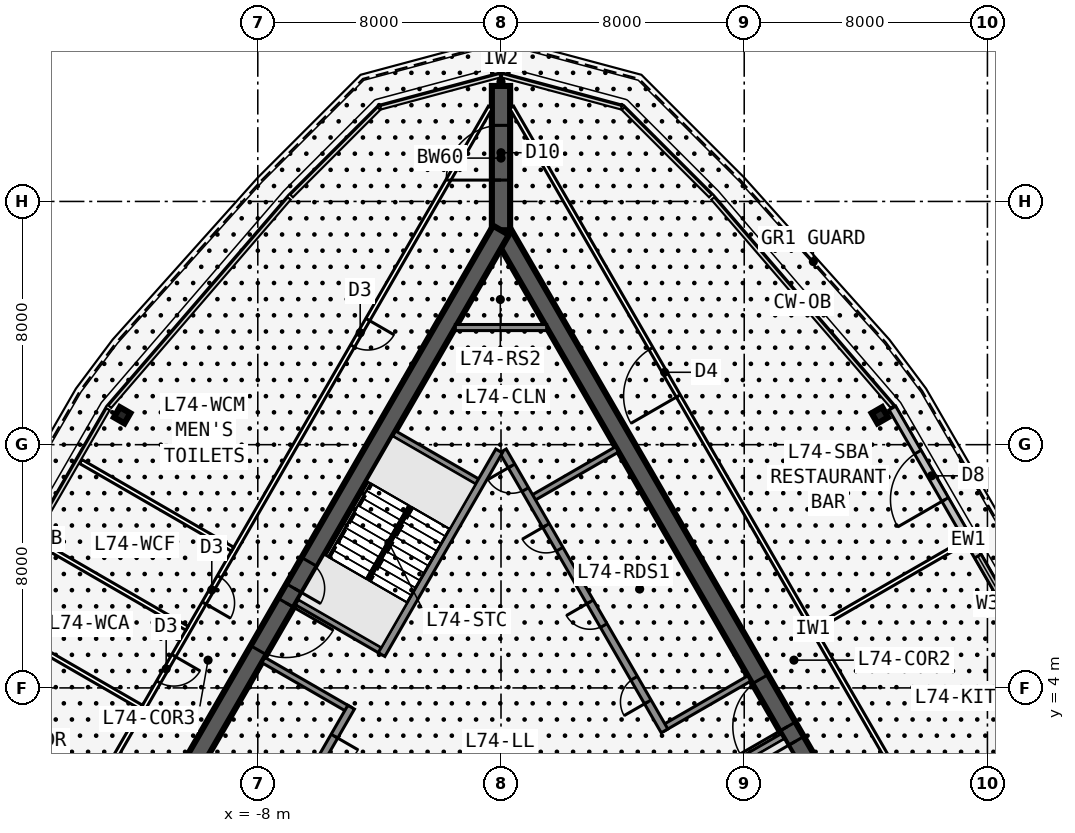
"""IFC4 building model, lengths in metres.
Left out: names, types, materials, properties, quantities, classifications, styles, units other than length and angle.
Written with IfcOpenShell. Run it as: python <this file> out.ifc"""

import sys

from ifc_helpers import new_model, si_unit, direction, frame, frame_2d, origin, origin_2d, place, context, subcontext, project, spatial, rectangle, i_section, extrude, element, fill, save


model = new_model("IFC4")
c1 = context("Model", 3, precision=1e-05, world=origin(), true_north=direction((0.0, 1.0)))
c2 = subcontext(c1, "Body", "Model", "MODEL_VIEW")
j1 = project(units=[si_unit("LENGTHUNIT", "METRE"), si_unit("PLANEANGLEUNIT", "RADIAN")], contexts=[c1])
p1 = place(None, origin())
s1 = spatial("IfcSite", under=j1, at=p1, CompositionType="ELEMENT")
p2 = place(p1, origin())
s2 = spatial("IfcBuilding", under=s1, at=p2, CompositionType="ELEMENT")
p3 = place(p2, frame((0.0, 0.0, 281.3)))
s3 = spatial("IfcBuildingStorey", under=s2, at=p3, CompositionType="ELEMENT", Elevation=281.3)
p4 = place(p3, frame((16.5, -9.526, 0.0), z_axis=(0.0, 0.0, 1.0), x_axis=(-0.499999749417, 0.866025548458, 0.0)))
e1 = element("IfcWall", 1, at=p4, inside=s3, PredefinedType="SHEAR", context=c2, shape_type="SweptSolid", body=[
    extrude(rectangle(XDim=33.0, YDim=0.6, at=frame_2d((16.5, 0.0))), origin(), (0.0, 0.0, 1.0), 5.5),
])
p5 = place(p4, frame((14.15, 0.0, 0.0)))
e2 = element("IfcOpeningElement", 2, at=p5, cuts=e1, PredefinedType="OPENING", context=c2, shape_type="SweptSolid", body=[
    extrude(rectangle(XDim=1.8, YDim=2.13, at=frame_2d((0.9, 1.065))), frame((0.0, 0.31, 0.0), z_axis=(0.0, -1.0, 0.0), x_axis=(1.0, 0.0, 0.0)), (0.0, 0.0, 1.0), 0.62),
])
p6 = place(p4, frame((12.6, 0.0, 0.0)))
e3 = element("IfcOpeningElement", 3, at=p6, cuts=e1, PredefinedType="OPENING", context=c2, shape_type="SweptSolid", body=[
    extrude(rectangle(XDim=1.0, YDim=2.13, at=frame_2d((0.5, 1.065))), frame((0.0, 0.31, 0.0), z_axis=(0.0, -1.0, 0.0), x_axis=(1.0, 0.0, 0.0)), (0.0, 0.0, 1.0), 0.62),
])
p7 = place(p3, frame((5.379, 2.586, 0.0), z_axis=(0.0, 0.0, 1.0), x_axis=(-0.500001375892, 0.866024609411, 0.0)))
e4 = element("IfcWall", 4, at=p7, inside=s3, PredefinedType="SOLIDWALL", context=c2, shape_type="SweptSolid", body=[
    extrude(rectangle(XDim=10.633, YDim=0.25, at=frame_2d((5.316, 0.0))), origin(), (0.0, 0.0, 1.0), 5.25),
])
p8 = place(p7, frame((9.164, 0.0, 0.0)))
e5 = element("IfcOpeningElement", 5, at=p8, cuts=e4, PredefinedType="OPENING", context=c2, shape_type="SweptSolid", body=[
    extrude(rectangle(XDim=0.9, YDim=2.13, at=frame_2d((0.45, 1.065))), frame((0.0, 0.135, 0.0), z_axis=(0.0, -1.0, 0.0), x_axis=(1.0, 0.0, 0.0)), (0.0, 0.0, 1.0), 0.27),
])
p9 = place(p7, frame((1.1, 0.0, 0.0)))
e6 = element("IfcOpeningElement", 6, at=p9, cuts=e4, PredefinedType="OPENING", context=c2, shape_type="SweptSolid", body=[
    extrude(rectangle(XDim=0.9, YDim=2.13, at=frame_2d((0.45, 1.065))), frame((0.0, 0.135, 0.0), z_axis=(0.0, -1.0, 0.0), x_axis=(1.0, 0.0, 0.0)), (0.0, 0.0, 1.0), 0.27),
])
p10 = place(p7, frame((4.0, 0.0, 0.0)))
e7 = element("IfcOpeningElement", 7, at=p10, cuts=e4, PredefinedType="OPENING", context=c2, shape_type="SweptSolid", body=[
    extrude(rectangle(XDim=0.9, YDim=2.13, at=frame_2d((0.45, 1.065))), frame((0.0, 0.135, 0.0), z_axis=(0.0, -1.0, 0.0), x_axis=(1.0, 0.0, 0.0)), (0.0, 0.0, 1.0), 0.27),
])
p11 = place(p7, frame((6.9, 0.0, 0.0)))
e8 = element("IfcOpeningElement", 8, at=p11, cuts=e4, PredefinedType="OPENING", context=c2, shape_type="SweptSolid", body=[
    extrude(rectangle(XDim=0.9, YDim=2.13, at=frame_2d((0.45, 1.065))), frame((0.0, 0.135, 0.0), z_axis=(0.0, -1.0, 0.0), x_axis=(1.0, 0.0, 0.0)), (0.0, 0.0, 1.0), 0.27),
])
for number, where, z_axis, x_axis in (
    (9, (6.429, 0.767, 0.0), (0.0, 0.0, 1.0), (0.866, 0.5, 0.0)),
    (10, (5.329, 2.673, 0.0), (0.0, 0.0, 1.0), (0.866, 0.5, 0.0)),
    (11, (0.979, 10.207, 0.0), (0.0, 0.0, 1.0), (0.866, 0.5, 0.0)),
):
    element("IfcWall", number, at=place(p3, frame(where, z_axis=z_axis, x_axis=x_axis)), inside=s3, PredefinedType="SOLIDWALL", context=c2, shape_type="SweptSolid", body=[
        extrude(rectangle(XDim=3.275, YDim=0.2, at=frame_2d((1.637, 0.0))), origin(), (0.0, 0.0, 1.0), 5.25),
    ])
p12 = place(p3, frame((0.0, 19.052, 0.0), z_axis=(0.0, 0.0, 1.0), x_axis=(-0.499999749417, -0.866025548458, 0.0)))
e12 = element("IfcWall", 12, at=p12, inside=s3, PredefinedType="SHEAR", context=c2, shape_type="SweptSolid", body=[
    extrude(rectangle(XDim=33.0, YDim=0.6, at=frame_2d((16.5, 0.0))), origin(), (0.0, 0.0, 1.0), 5.5),
])
p13 = place(p12, frame((14.15, 0.0, 0.0)))
e13 = element("IfcOpeningElement", 13, at=p13, cuts=e12, PredefinedType="OPENING", context=c2, shape_type="SweptSolid", body=[
    extrude(rectangle(XDim=1.8, YDim=2.13, at=frame_2d((0.9, 1.065))), frame((0.0, 0.31, 0.0), z_axis=(0.0, -1.0, 0.0), x_axis=(1.0, 0.0, 0.0)), (0.0, 0.0, 1.0), 0.62),
])
p14 = place(p12, frame((12.6, 0.0, 0.0)))
e14 = element("IfcOpeningElement", 14, at=p14, cuts=e12, PredefinedType="OPENING", context=c2, shape_type="SweptSolid", body=[
    extrude(rectangle(XDim=1.0, YDim=2.13, at=frame_2d((0.5, 1.065))), frame((0.0, 0.31, 0.0), z_axis=(0.0, -1.0, 0.0), x_axis=(1.0, 0.0, 0.0)), (0.0, 0.0, 1.0), 0.62),
])
p15 = place(p3, frame((-0.062, 11.794, 0.0), z_axis=(0.0, 0.0, 1.0), x_axis=(-0.500006680225, -0.86602154692, 0.0)))
e15 = element("IfcWall", 15, at=p15, inside=s3, PredefinedType="SOLIDWALL", context=c2, shape_type="SweptSolid", body=[
    extrude(rectangle(XDim=7.733, YDim=0.25, at=frame_2d((3.866, 0.0))), origin(), (0.0, 0.0, 1.0), 5.25),
])
p16 = place(p3, frame((-4.929, 3.365, 0.0), z_axis=(0.0, 0.0, 1.0), x_axis=(-0.499991433582, -0.866030349552, 0.0)))
e16 = element("IfcWall", 16, at=p16, inside=s3, PredefinedType="SOLIDWALL", context=c2, shape_type="SweptSolid", body=[
    extrude(rectangle(XDim=10.633, YDim=0.25, at=frame_2d((5.316, 0.0))), origin(), (0.0, 0.0, 1.0), 5.25),
])
p17 = place(p16, frame((9.164, 0.0, 0.0)))
e17 = element("IfcOpeningElement", 17, at=p17, cuts=e16, PredefinedType="OPENING", context=c2, shape_type="SweptSolid", body=[
    extrude(rectangle(XDim=0.9, YDim=2.13, at=frame_2d((0.45, 1.065))), frame((0.0, 0.135, 0.0), z_axis=(0.0, -1.0, 0.0), x_axis=(1.0, 0.0, 0.0)), (0.0, 0.0, 1.0), 0.27),
])
p18 = place(p16, frame((1.1, 0.0, 0.0)))
e18 = element("IfcOpeningElement", 18, at=p18, cuts=e16, PredefinedType="OPENING", context=c2, shape_type="SweptSolid", body=[
    extrude(rectangle(XDim=0.9, YDim=2.13, at=frame_2d((0.45, 1.065))), frame((0.0, 0.135, 0.0), z_axis=(0.0, -1.0, 0.0), x_axis=(1.0, 0.0, 0.0)), (0.0, 0.0, 1.0), 0.27),
])
p19 = place(p16, frame((4.0, 0.0, 0.0)))
e19 = element("IfcOpeningElement", 19, at=p19, cuts=e16, PredefinedType="OPENING", context=c2, shape_type="SweptSolid", body=[
    extrude(rectangle(XDim=0.9, YDim=2.13, at=frame_2d((0.45, 1.065))), frame((0.0, 0.135, 0.0), z_axis=(0.0, -1.0, 0.0), x_axis=(1.0, 0.0, 0.0)), (0.0, 0.0, 1.0), 0.27),
])
p20 = place(p16, frame((6.8, 0.0, 0.0)))
e20 = element("IfcOpeningElement", 20, at=p20, cuts=e16, PredefinedType="OPENING", context=c2, shape_type="SweptSolid", body=[
    extrude(rectangle(XDim=1.1, YDim=2.13, at=frame_2d((0.55, 1.065))), frame((0.0, 0.135, 0.0), z_axis=(0.0, -1.0, 0.0), x_axis=(1.0, 0.0, 0.0)), (0.0, 0.0, 1.0), 0.27),
])
for number, where, z_axis, x_axis in (
    (21, (-0.679, 10.727, 0.0), (0.0, 0.0, 1.0), (-0.866, 0.5, 0.0)),
    (22, (-3.879, 5.184, 0.0), (0.0, 0.0, 1.0), (-0.866, 0.5, 0.0)),
    (23, (-4.979, 3.279, 0.0), (0.0, 0.0, 1.0), (-0.866, 0.5, 0.0)),
):
    element("IfcWall", number, at=place(p3, frame(where, z_axis=z_axis, x_axis=x_axis)), inside=s3, PredefinedType="SOLIDWALL", context=c2, shape_type="SweptSolid", body=[
        extrude(rectangle(XDim=3.275, YDim=0.2, at=frame_2d((1.637, 0.0))), origin(), (0.0, 0.0, 1.0), 5.25),
    ])
p21 = place(p3, frame((0.0, 19.052, 0.0), z_axis=(0.0, 0.0, 1.0), x_axis=(0.0, 1.0, 0.0)))
e24 = element("IfcWall", 24, at=p21, inside=s3, PredefinedType="SHEAR", context=c2, shape_type="SweptSolid", body=[
    extrude(rectangle(XDim=4.746, YDim=0.6, at=frame_2d((2.373, 0.0))), origin(), (0.0, 0.0, 1.0), 5.5),
])
p22 = place(p21, frame((1.65, 0.0, 0.0)))
e25 = element("IfcOpeningElement", 25, at=p22, cuts=e24, PredefinedType="OPENING", context=c2, shape_type="SweptSolid", body=[
    extrude(rectangle(XDim=1.8, YDim=2.13, at=frame_2d((0.9, 1.065))), frame((0.0, 0.31, 0.0), z_axis=(0.0, -1.0, 0.0), x_axis=(1.0, 0.0, 0.0)), (0.0, 0.0, 1.0), 0.62),
])
for number, where, z_axis, x_axis in (
    (26, (12.461, 12.968, 0.0), (0.0, 0.0, 1.0), (0.866, 0.5, 0.0)),
    (27, (-12.461, 12.968, 0.0), (0.0, 0.0, 1.0), (-0.866, 0.5, 0.0)),
):
    element("IfcColumn", number, at=place(p3, frame(where, z_axis=z_axis, x_axis=x_axis)), inside=s3, PredefinedType="COLUMN", context=c2, shape_type="SweptSolid", body=[
        extrude(i_section(OverallWidth=0.399, OverallDepth=0.386, WebThickness=0.021, FlangeThickness=0.033, at=origin_2d()), origin(), (0.0, 0.0, 1.0), 5.5),
    ])
p23 = place(p3, frame((17.873, 4.545, 0.0), z_axis=(0.0, 0.0, 1.0), x_axis=(-0.500004234368, 0.866022959057, 0.0)))
e28 = element("IfcWall", 28, at=p23, inside=s3, PredefinedType="STANDARD", context=c2, shape_type="SweptSolid", body=[
    extrude(rectangle(XDim=10.0, YDim=0.25, at=frame_2d((5.0, 0.0))), origin(), (0.0, 0.0, 1.0), 5.25),
])
p24 = place(p23, frame((0.775, 0.0, 0.6)))
e29 = element("IfcOpeningElement", 29, at=p24, cuts=e28, PredefinedType="OPENING", context=c2, shape_type="SweptSolid", body=[
    extrude(rectangle(XDim=3.6, YDim=3.6, at=frame_2d((1.8, 1.8))), frame((0.0, 0.135, 0.0), z_axis=(0.0, -1.0, 0.0), x_axis=(1.0, 0.0, 0.0)), (0.0, 0.0, 1.0), 0.27),
])
p25 = place(p23, frame((6.525, 0.0, 0.0)))
e30 = element("IfcOpeningElement", 30, at=p25, cuts=e28, PredefinedType="OPENING", context=c2, shape_type="SweptSolid", body=[
    extrude(rectangle(XDim=1.8, YDim=2.4, at=frame_2d((0.9, 1.2))), frame((0.0, 0.135, 0.0), z_axis=(0.0, -1.0, 0.0), x_axis=(1.0, 0.0, 0.0)), (0.0, 0.0, 1.0), 0.27),
])
p26 = place(p3, frame((20.177, -11.245, 0.0), z_axis=(0.0, 0.0, 1.0), x_axis=(-0.499998875317, 0.866026053119, 0.0)))
e31 = element("IfcWall", 31, at=p26, inside=s3, PredefinedType="PARTITIONING", context=c2, shape_type="SweptSolid", body=[
    extrude(rectangle(XDim=39.654, YDim=0.15, at=frame_2d((19.827, 0.0))), origin(), (0.0, 0.0, 1.0), 5.25),
])
p27 = place(p26, frame((9.164, 0.0, 0.0)))
e32 = element("IfcOpeningElement", 32, at=p27, cuts=e31, PredefinedType="OPENING", context=c2, shape_type="SweptSolid", body=[
    extrude(rectangle(XDim=1.8, YDim=2.13, at=frame_2d((0.9, 1.065))), frame((0.0, 0.085, 0.0), z_axis=(0.0, -1.0, 0.0), x_axis=(1.0, 0.0, 0.0)), (0.0, 0.0, 1.0), 0.17),
])
p28 = place(p26, frame((28.69, 0.0, 0.0)))
e33 = element("IfcOpeningElement", 33, at=p28, cuts=e31, PredefinedType="OPENING", context=c2, shape_type="SweptSolid", body=[
    extrude(rectangle(XDim=1.8, YDim=2.13, at=frame_2d((0.9, 1.065))), frame((0.0, 0.085, 0.0), z_axis=(0.0, -1.0, 0.0), x_axis=(1.0, 0.0, 0.0)), (0.0, 0.0, 1.0), 0.17),
])
p29 = place(p3, frame((10.329, 5.963, 0.0), z_axis=(0.0, 0.0, 1.0), x_axis=(0.86601224135, 0.500022797313, 0.0)))
e34 = element("IfcWall", 34, at=p29, inside=s3, PredefinedType="PARTITIONING", context=c2, shape_type="SweptSolid", body=[
    extrude(rectangle(XDim=5.699, YDim=0.15, at=frame_2d((2.85, 0.0))), origin(), (0.0, 0.0, 1.0), 4.394),
])
p30 = place(p3, frame((-0.35, 23.096, 0.0), z_axis=(0.0, 0.0, 1.0), x_axis=(-0.499998875317, -0.866026053119, 0.0)))
e35 = element("IfcWall", 35, at=p30, inside=s3, PredefinedType="PARTITIONING", context=c2, shape_type="SweptSolid", body=[
    extrude(rectangle(XDim=39.654, YDim=0.15, at=frame_2d((19.827, 0.0))), origin(), (0.0, 0.0, 1.0), 5.25),
])
p31 = place(p30, frame((8.063, 0.0, 0.0)))
e36 = element("IfcOpeningElement", 36, at=p31, cuts=e35, PredefinedType="OPENING", context=c2, shape_type="SweptSolid", body=[
    extrude(rectangle(XDim=1.0, YDim=2.13, at=frame_2d((0.5, 1.065))), frame((0.0, 0.085, 0.0), z_axis=(0.0, -1.0, 0.0), x_axis=(1.0, 0.0, 0.0)), (0.0, 0.0, 1.0), 0.17),
])
p32 = place(p30, frame((17.827, 0.0, 0.0)))
e37 = element("IfcOpeningElement", 37, at=p32, cuts=e35, PredefinedType="OPENING", context=c2, shape_type="SweptSolid", body=[
    extrude(rectangle(XDim=1.0, YDim=2.13, at=frame_2d((0.5, 1.065))), frame((0.0, 0.085, 0.0), z_axis=(0.0, -1.0, 0.0), x_axis=(1.0, 0.0, 0.0)), (0.0, 0.0, 1.0), 0.17),
])
p33 = place(p30, frame((20.827, 0.0, 0.0)))
e38 = element("IfcOpeningElement", 38, at=p33, cuts=e35, PredefinedType="OPENING", context=c2, shape_type="SweptSolid", body=[
    extrude(rectangle(XDim=1.0, YDim=2.13, at=frame_2d((0.5, 1.065))), frame((0.0, 0.085, 0.0), z_axis=(0.0, -1.0, 0.0), x_axis=(1.0, 0.0, 0.0)), (0.0, 0.0, 1.0), 0.17),
])
p34 = place(p30, frame((30.591, 0.0, 0.0)))
e39 = element("IfcOpeningElement", 39, at=p34, cuts=e35, PredefinedType="OPENING", context=c2, shape_type="SweptSolid", body=[
    extrude(rectangle(XDim=1.0, YDim=2.13, at=frame_2d((0.5, 1.065))), frame((0.0, 0.085, 0.0), z_axis=(0.0, -1.0, 0.0), x_axis=(1.0, 0.0, 0.0)), (0.0, 0.0, 1.0), 0.17),
])
p35 = place(p3, frame((-8.829, 8.561, 0.0), z_axis=(0.0, 0.0, 1.0), x_axis=(-0.866015751745, 0.50001671745, 0.0)))
e40 = element("IfcWall", 40, at=p35, inside=s3, PredefinedType="PARTITIONING", context=c2, shape_type="SweptSolid", body=[
    extrude(rectangle(XDim=5.769, YDim=0.15, at=frame_2d((2.885, 0.0))), origin(), (0.0, 0.0, 1.0), 5.25),
])
p36 = place(p3, frame((-10.329, 5.963, 0.0), z_axis=(0.0, 0.0, 1.0), x_axis=(-0.866015751745, 0.50001671745, 0.0)))
e41 = element("IfcWall", 41, at=p36, inside=s3, PredefinedType="PARTITIONING", context=c2, shape_type="SweptSolid", body=[
    extrude(rectangle(XDim=5.769, YDim=0.15, at=frame_2d((2.885, 0.0))), origin(), (0.0, 0.0, 1.0), 4.394),
])
p37 = place(p3, frame((-11.829, 3.365, 0.0), z_axis=(0.0, 0.0, 1.0), x_axis=(-0.866015751745, 0.50001671745, 0.0)))
e42 = element("IfcWall", 42, at=p37, inside=s3, PredefinedType="PARTITIONING", context=c2, shape_type="SweptSolid", body=[
    extrude(rectangle(XDim=5.769, YDim=0.15, at=frame_2d((2.885, 0.0))), origin(), (0.0, 0.0, 1.0), 5.25),
])
p38 = place(p3, frame((0.0, 23.799, 0.0), z_axis=(0.0, 0.0, 1.0), x_axis=(0.0, 1.0, 0.0)))
e43 = element("IfcWall", 43, at=p38, inside=s3, PredefinedType="PARTITIONING", context=c2, shape_type="SweptSolid", body=[
    extrude(rectangle(XDim=0.27, YDim=0.15, at=frame_2d((0.135, 0.0))), origin(), (0.0, 0.0, 1.0), 5.25),
])
p39 = place(p3, frame((-1.501, 15.853, 0.0), z_axis=(0.0, 0.0, 1.0), x_axis=(1.0, 0.0, 0.0)))
e44 = element("IfcWall", 44, at=p39, inside=s3, PredefinedType="SOLIDWALL", context=c2, shape_type="SweptSolid", body=[
    extrude(rectangle(XDim=3.002, YDim=0.2, at=frame_2d((1.501, 0.0))), origin(), (0.0, 0.0, 1.0), 5.25),
])
p40 = place(p3, frame((-2.988, 9.978, 0.0), z_axis=(0.0, 0.0, 1.0), x_axis=(-0.499992232847, -0.866029888106, 0.0)))
e45 = element("IfcWall", 45, at=p40, inside=s3, PredefinedType="SOLIDWALL", context=c2, shape_type="SweptSolid", body=[
    extrude(rectangle(XDim=2.794, YDim=0.1, at=frame_2d((1.397, 0.0))), origin(), (0.0, 0.0, 1.0), 5.5),
])
p41 = place(p24, origin())
e46 = element("IfcWindow", 46, at=p41, inside=s3, PartitioningType="SINGLE_PANEL", PredefinedType="WINDOW", context=c2, shape_type="SweptSolid", body=[
    extrude(rectangle(XDim=3.6, YDim=3.6, at=frame_2d((1.8, 1.8))), frame((0.0, 0.03, 0.0), z_axis=(0.0, -1.0, 0.0), x_axis=(1.0, 0.0, 0.0)), (0.0, 0.0, 1.0), 0.06),
])
fill(e29, e46)
p42 = place(p25, origin())
e47 = element("IfcDoor", 47, at=p42, inside=s3, OperationType="DOUBLE_DOOR_SINGLE_SWING", PredefinedType="DOOR", context=c2, shape_type="SweptSolid", body=[
    extrude(rectangle(XDim=1.8, YDim=2.4, at=frame_2d((0.9, 1.2))), frame((0.0, 0.025, 0.0), z_axis=(0.0, -1.0, 0.0), x_axis=(1.0, 0.0, 0.0)), (0.0, 0.0, 1.0), 0.05),
])
fill(e30, e47)
p43 = place(p28, origin())
e48 = element("IfcDoor", 48, at=p43, inside=s3, OperationType="DOUBLE_DOOR_SINGLE_SWING", PredefinedType="DOOR", context=c2, shape_type="SweptSolid", body=[
    extrude(rectangle(XDim=1.8, YDim=2.13, at=frame_2d((0.9, 1.065))), frame((0.0, 0.025, 0.0), z_axis=(0.0, -1.0, 0.0), x_axis=(1.0, 0.0, 0.0)), (0.0, 0.0, 1.0), 0.05),
])
fill(e33, e48)
p44 = place(p31, origin())
e49 = element("IfcDoor", 49, at=p44, inside=s3, OperationType="SINGLE_SWING_LEFT", PredefinedType="DOOR", context=c2, shape_type="SweptSolid", body=[
    extrude(rectangle(XDim=1.0, YDim=2.13, at=frame_2d((0.5, 1.065))), frame((0.0, 0.025, 0.0), z_axis=(0.0, -1.0, 0.0), x_axis=(1.0, 0.0, 0.0)), (0.0, 0.0, 1.0), 0.05),
])
fill(e36, e49)
p45 = place(p32, origin())
e50 = element("IfcDoor", 50, at=p45, inside=s3, OperationType="SINGLE_SWING_RIGHT", PredefinedType="DOOR", context=c2, shape_type="SweptSolid", body=[
    extrude(rectangle(XDim=1.0, YDim=2.13, at=frame_2d((0.5, 1.065))), frame((0.0, 0.025, 0.0), z_axis=(0.0, -1.0, 0.0), x_axis=(1.0, 0.0, 0.0)), (0.0, 0.0, 1.0), 0.05),
])
fill(e37, e50)
p46 = place(p33, origin())
e51 = element("IfcDoor", 51, at=p46, inside=s3, OperationType="SINGLE_SWING_LEFT", PredefinedType="DOOR", context=c2, shape_type="SweptSolid", body=[
    extrude(rectangle(XDim=1.0, YDim=2.13, at=frame_2d((0.5, 1.065))), frame((0.0, 0.025, 0.0), z_axis=(0.0, -1.0, 0.0), x_axis=(1.0, 0.0, 0.0)), (0.0, 0.0, 1.0), 0.05),
])
fill(e38, e51)
p47 = place(p5, origin())
e52 = element("IfcDoor", 52, at=p47, inside=s3, OperationType="DOUBLE_DOOR_SINGLE_SWING", PredefinedType="DOOR", context=c2, shape_type="SweptSolid", body=[
    extrude(rectangle(XDim=1.8, YDim=2.13, at=frame_2d((0.9, 1.065))), frame((0.0, 0.025, 0.0), z_axis=(0.0, -1.0, 0.0), x_axis=(1.0, 0.0, 0.0)), (0.0, 0.0, 1.0), 0.05),
])
fill(e2, e52)
p48 = place(p6, origin())
e53 = element("IfcDoor", 53, at=p48, inside=s3, OperationType="SINGLE_SWING_RIGHT", PredefinedType="DOOR", context=c2, shape_type="SweptSolid", body=[
    extrude(rectangle(XDim=1.0, YDim=2.13, at=frame_2d((0.5, 1.065))), frame((0.0, 0.025, 0.0), z_axis=(0.0, -1.0, 0.0), x_axis=(1.0, 0.0, 0.0)), (0.0, 0.0, 1.0), 0.05),
])
fill(e3, e53)
p49 = place(p13, origin())
e54 = element("IfcDoor", 54, at=p49, inside=s3, OperationType="DOUBLE_DOOR_SINGLE_SWING", PredefinedType="DOOR", context=c2, shape_type="SweptSolid", body=[
    extrude(rectangle(XDim=1.8, YDim=2.13, at=frame_2d((0.9, 1.065))), frame((0.0, 0.025, 0.0), z_axis=(0.0, -1.0, 0.0), x_axis=(1.0, 0.0, 0.0)), (0.0, 0.0, 1.0), 0.05),
])
fill(e13, e54)
p50 = place(p14, origin())
e55 = element("IfcDoor", 55, at=p50, inside=s3, OperationType="SINGLE_SWING_RIGHT", PredefinedType="DOOR", context=c2, shape_type="SweptSolid", body=[
    extrude(rectangle(XDim=1.0, YDim=2.13, at=frame_2d((0.5, 1.065))), frame((0.0, 0.025, 0.0), z_axis=(0.0, -1.0, 0.0), x_axis=(1.0, 0.0, 0.0)), (0.0, 0.0, 1.0), 0.05),
])
fill(e14, e55)
p51 = place(p22, origin())
e56 = element("IfcDoor", 56, at=p51, inside=s3, OperationType="DOUBLE_DOOR_DOUBLE_SWING", PredefinedType="DOOR", context=c2, shape_type="SweptSolid", body=[
    extrude(rectangle(XDim=1.8, YDim=2.13, at=frame_2d((0.9, 1.065))), frame((0.0, 0.025, 0.0), z_axis=(0.0, -1.0, 0.0), x_axis=(1.0, 0.0, 0.0)), (0.0, 0.0, 1.0), 0.05),
])
fill(e25, e56)
p52 = place(p8, origin())
e57 = element("IfcDoor", 57, at=p52, inside=s3, OperationType="SINGLE_SWING_RIGHT", PredefinedType="DOOR", context=c2, shape_type="SweptSolid", body=[
    extrude(rectangle(XDim=0.9, YDim=2.13, at=frame_2d((0.45, 1.065))), frame((0.0, 0.025, 0.0), z_axis=(0.0, -1.0, 0.0), x_axis=(1.0, 0.0, 0.0)), (0.0, 0.0, 1.0), 0.05),
])
fill(e5, e57)
p53 = place(p9, origin())
e58 = element("IfcDoor", 58, at=p53, inside=s3, OperationType="SINGLE_SWING_LEFT", PredefinedType="DOOR", context=c2, shape_type="SweptSolid", body=[
    extrude(rectangle(XDim=0.9, YDim=2.13, at=frame_2d((0.45, 1.065))), frame((0.0, 0.025, 0.0), z_axis=(0.0, -1.0, 0.0), x_axis=(1.0, 0.0, 0.0)), (0.0, 0.0, 1.0), 0.05),
])
fill(e6, e58)
p54 = place(p10, origin())
e59 = element("IfcDoor", 59, at=p54, inside=s3, OperationType="SINGLE_SWING_RIGHT", PredefinedType="DOOR", context=c2, shape_type="SweptSolid", body=[
    extrude(rectangle(XDim=0.9, YDim=2.13, at=frame_2d((0.45, 1.065))), frame((0.0, 0.025, 0.0), z_axis=(0.0, -1.0, 0.0), x_axis=(1.0, 0.0, 0.0)), (0.0, 0.0, 1.0), 0.05),
])
fill(e7, e59)
p55 = place(p11, origin())
e60 = element("IfcDoor", 60, at=p55, inside=s3, OperationType="SINGLE_SWING_RIGHT", PredefinedType="DOOR", context=c2, shape_type="SweptSolid", body=[
    extrude(rectangle(XDim=0.9, YDim=2.13, at=frame_2d((0.45, 1.065))), frame((0.0, 0.025, 0.0), z_axis=(0.0, -1.0, 0.0), x_axis=(1.0, 0.0, 0.0)), (0.0, 0.0, 1.0), 0.05),
])
fill(e8, e60)
p56 = place(p18, origin())
e61 = element("IfcDoor", 61, at=p56, inside=s3, OperationType="SINGLE_SWING_LEFT", PredefinedType="DOOR", context=c2, shape_type="SweptSolid", body=[
    extrude(rectangle(XDim=0.9, YDim=2.13, at=frame_2d((0.45, 1.065))), frame((0.0, 0.025, 0.0), z_axis=(0.0, -1.0, 0.0), x_axis=(1.0, 0.0, 0.0)), (0.0, 0.0, 1.0), 0.05),
])
fill(e18, e61)
save(model, sys.argv[1])
